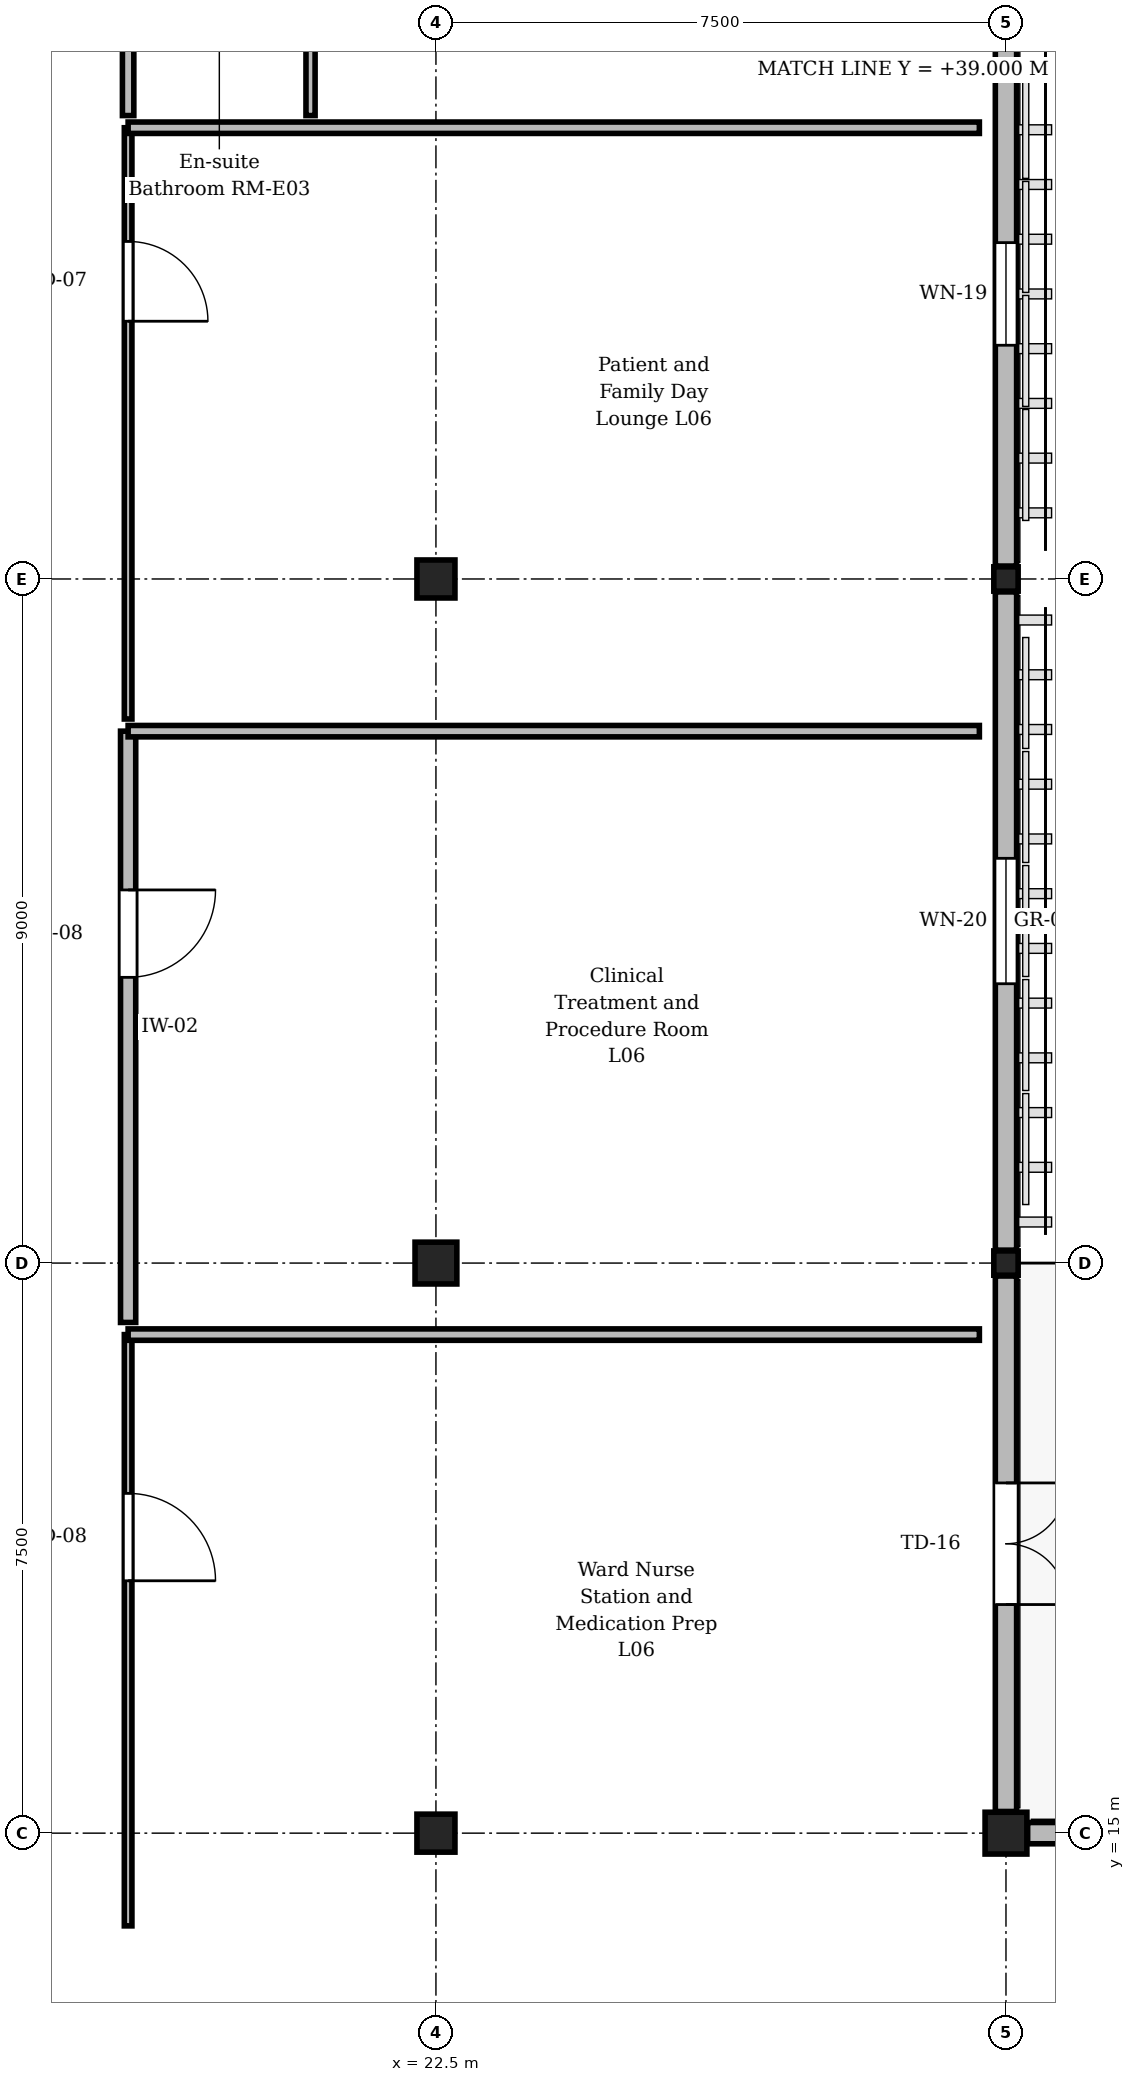
"""IFC4 building model, lengths in metres.
Left out: names, types, materials, properties, quantities, classifications, styles, units other than length and angle.
Written with IfcOpenShell. Run it as: python <this file> out.ifc"""

import sys

from ifc_helpers import new_model, si_unit, direction, frame, frame_2d, origin, origin_2d, place, context, subcontext, project, spatial, rectangle, extrude, element, fill, save


model = new_model("IFC4")
c1 = context("Model", 3, precision=1e-05, world=origin(), true_north=direction((0.0, 1.0)))
c2 = subcontext(c1, "Body", "Model", "MODEL_VIEW")
j1 = project(units=[si_unit("LENGTHUNIT", "METRE"), si_unit("PLANEANGLEUNIT", "RADIAN")], contexts=[c1])
p1 = place(None, origin())
s1 = spatial("IfcSite", under=j1, at=p1, CompositionType="ELEMENT")
p2 = place(p1, origin())
s2 = spatial("IfcBuilding", under=s1, at=p2, CompositionType="ELEMENT")
p3 = place(p2, frame((0.0, 0.0, 25.95)))
s3 = spatial("IfcBuildingStorey", under=s2, at=p3, CompositionType="ELEMENT", Elevation=25.95)
p4 = place(p3, frame((22.5, 15.0, 0.0), z_axis=(0.0, 0.0, 1.0), x_axis=(1.0, 0.0, 0.0)))
e1 = element("IfcColumn", 1, at=p4, inside=s3, PredefinedType="COLUMN", context=c2, shape_type="SweptSolid", body=[
    extrude(rectangle(XDim=0.5, YDim=0.5, at=origin_2d()), origin(), (0.0, 0.0, 1.0), 4.05),
])
p5 = place(p3, frame((22.5, 22.5, 0.0), z_axis=(0.0, 0.0, 1.0), x_axis=(1.0, 0.0, 0.0)))
e2 = element("IfcColumn", 2, at=p5, inside=s3, PredefinedType="COLUMN", context=c2, shape_type="SweptSolid", body=[
    extrude(rectangle(XDim=0.55, YDim=0.55, at=origin_2d()), origin(), (0.0, 0.0, 1.0), 4.05),
])
p6 = place(p3, frame((22.5, 31.5, 0.0), z_axis=(0.0, 0.0, 1.0), x_axis=(1.0, 0.0, 0.0)))
e3 = element("IfcColumn", 3, at=p6, inside=s3, PredefinedType="COLUMN", context=c2, shape_type="SweptSolid", body=[
    extrude(rectangle(XDim=0.5, YDim=0.5, at=origin_2d()), origin(), (0.0, 0.0, 1.0), 4.05),
])
p7 = place(p3, frame((30.0, 15.0, 0.0), z_axis=(0.0, 0.0, 1.0), x_axis=(1.0, 0.0, 0.0)))
e4 = element("IfcColumn", 4, at=p7, inside=s3, PredefinedType="COLUMN", context=c2, shape_type="SweptSolid", body=[
    extrude(rectangle(XDim=0.55, YDim=0.55, at=origin_2d()), origin(), (0.0, 0.0, 1.0), 4.05),
])
for number, where, z_axis, x_axis in (
    (5, (30.0, 22.5, 0.0), (0.0, 0.0, 1.0), (1.0, 0.0, 0.0)),
    (6, (30.0, 31.5, 0.0), (0.0, 0.0, 1.0), (1.0, 0.0, 0.0)),
):
    element("IfcColumn", number, at=place(p3, frame(where, z_axis=z_axis, x_axis=x_axis)), inside=s3, PredefinedType="COLUMN", context=c2, shape_type="SweptSolid", body=[
        extrude(rectangle(XDim=0.32, YDim=0.32, at=origin_2d()), origin(), (0.0, 0.0, 1.0), 4.05),
    ])
p8 = place(p3, frame((30.0, 22.33, 0.0), z_axis=(0.0, 0.0, 1.0), x_axis=(0.0, -1.0, 0.0)))
e7 = element("IfcWall", 7, at=p8, inside=s3, PredefinedType="STANDARD", context=c2, shape_type="SweptSolid", body=[
    extrude(rectangle(XDim=7.045, YDim=0.28, at=frame_2d((3.522, 0.0))), origin(), (0.0, 0.0, 1.0), 3.17),
])
p9 = place(p8, frame((2.722, 0.0, 0.0)))
e8 = element("IfcOpeningElement", 8, at=p9, cuts=e7, PredefinedType="OPENING", context=c2, shape_type="SweptSolid", body=[
    extrude(rectangle(XDim=1.6, YDim=2.35, at=frame_2d((0.8, 1.175))), frame((0.0, 0.15, 0.0), z_axis=(0.0, -1.0, 0.0), x_axis=(1.0, 0.0, 0.0)), (0.0, 0.0, 1.0), 0.3),
])
p10 = place(p3, frame((30.0, 31.33, 0.0), z_axis=(0.0, 0.0, 1.0), x_axis=(0.0, -1.0, 0.0)))
e9 = element("IfcWall", 9, at=p10, inside=s3, PredefinedType="STANDARD", context=c2, shape_type="SweptSolid", body=[
    extrude(rectangle(XDim=8.66, YDim=0.28, at=frame_2d((4.33, 0.0))), origin(), (0.0, 0.0, 1.0), 3.22),
])
p11 = place(p10, frame((3.505, 0.0, 0.85)))
e10 = element("IfcOpeningElement", 10, at=p11, cuts=e9, PredefinedType="OPENING", context=c2, shape_type="SweptSolid", body=[
    extrude(rectangle(XDim=1.65, YDim=2.09, at=frame_2d((0.825, 1.045))), frame((0.0, 0.15, 0.0), z_axis=(0.0, -1.0, 0.0), x_axis=(1.0, 0.0, 0.0)), (0.0, 0.0, 1.0), 0.3),
])
p12 = place(p3, frame((30.0, 38.83, 0.0), z_axis=(0.0, 0.0, 1.0), x_axis=(0.0, -1.0, 0.0)))
e11 = element("IfcWall", 11, at=p12, inside=s3, PredefinedType="STANDARD", context=c2, shape_type="SweptSolid", body=[
    extrude(rectangle(XDim=7.16, YDim=0.28, at=frame_2d((3.58, 0.0))), origin(), (0.0, 0.0, 1.0), 3.17),
])
p13 = place(p12, frame((2.905, 0.0, 0.85)))
e12 = element("IfcOpeningElement", 12, at=p13, cuts=e11, PredefinedType="OPENING", context=c2, shape_type="SweptSolid", body=[
    extrude(rectangle(XDim=1.35, YDim=2.04, at=frame_2d((0.675, 1.02))), frame((0.0, 0.15, 0.0), z_axis=(0.0, -1.0, 0.0), x_axis=(1.0, 0.0, 0.0)), (0.0, 0.0, 1.0), 0.3),
])
p14 = place(p3, frame((30.285, 15.0, 0.0), z_axis=(0.0, 0.0, 1.0), x_axis=(1.0, 0.0, 0.0)))
e13 = element("IfcWall", 13, at=p14, inside=s3, PredefinedType="STANDARD", context=c2, shape_type="SweptSolid", body=[
    extrude(rectangle(XDim=6.98, YDim=0.28, at=frame_2d((3.49, 0.0))), origin(), (0.0, 0.0, 1.0), 3.17),
])
p15 = place(p14, frame((2.69, 0.0, 0.0)))
e14 = element("IfcOpeningElement", 14, at=p15, cuts=e13, PredefinedType="OPENING", context=c2, shape_type="SweptSolid", body=[
    extrude(rectangle(XDim=1.6, YDim=2.35, at=frame_2d((0.8, 1.175))), frame((0.0, 0.15, 0.0), z_axis=(0.0, -1.0, 0.0), x_axis=(1.0, 0.0, 0.0)), (0.0, 0.0, 1.0), 0.3),
])
p16 = place(p3, frame((18.45, 21.559, 0.0), z_axis=(0.0, 0.0, 1.0), x_axis=(0.0, -1.0, 0.0)))
e15 = element("IfcWall", 15, at=p16, inside=s3, PredefinedType="PARTITIONING", context=c2, shape_type="SweptSolid", body=[
    extrude(rectangle(XDim=7.779, YDim=0.1, at=frame_2d((3.889, 0.0))), origin(), (0.0, 0.0, 1.0), 3.755),
])
p17 = place(p16, frame((2.089, 0.0, 0.0)))
e16 = element("IfcOpeningElement", 16, at=p17, cuts=e15, PredefinedType="OPENING", context=c2, shape_type="SweptSolid", body=[
    extrude(rectangle(XDim=1.15, YDim=2.2, at=frame_2d((0.575, 1.1))), frame((0.0, 0.06, 0.0), z_axis=(0.0, -1.0, 0.0), x_axis=(1.0, 0.0, 0.0)), (0.0, 0.0, 1.0), 0.12),
])
p18 = place(p3, frame((18.45, 29.498, 0.0), z_axis=(0.0, 0.0, 1.0), x_axis=(0.0, -1.0, 0.0)))
e17 = element("IfcWall", 17, at=p18, inside=s3, PredefinedType="STANDARD", context=c2, shape_type="SweptSolid", body=[
    extrude(rectangle(XDim=7.779, YDim=0.2, at=frame_2d((3.889, 0.0))), origin(), (0.0, 0.0, 1.0), 3.355),
])
p19 = place(p18, frame((2.089, 0.0, 0.0)))
e18 = element("IfcOpeningElement", 18, at=p19, cuts=e17, PredefinedType="OPENING", context=c2, shape_type="SweptSolid", body=[
    extrude(rectangle(XDim=1.15, YDim=2.2, at=frame_2d((0.575, 1.1))), frame((0.0, 0.11, 0.0), z_axis=(0.0, -1.0, 0.0), x_axis=(1.0, 0.0, 0.0)), (0.0, 0.0, 1.0), 0.22),
])
p20 = place(p3, frame((18.45, 37.437, 0.0), z_axis=(0.0, 0.0, 1.0), x_axis=(0.0, -1.0, 0.0)))
e19 = element("IfcWall", 19, at=p20, inside=s3, PredefinedType="PARTITIONING", context=c2, shape_type="SweptSolid", body=[
    extrude(rectangle(XDim=7.779, YDim=0.1, at=frame_2d((3.89, 0.0))), origin(), (0.0, 0.0, 1.0), 3.355),
])
p21 = place(p20, frame((1.496, 0.0, 0.0)))
e20 = element("IfcOpeningElement", 20, at=p21, cuts=e19, PredefinedType="OPENING", context=c2, shape_type="SweptSolid", body=[
    extrude(rectangle(XDim=1.05, YDim=2.2, at=frame_2d((0.525, 1.1))), frame((0.0, 0.06, 0.0), z_axis=(0.0, -1.0, 0.0), x_axis=(1.0, 0.0, 0.0)), (0.0, 0.0, 1.0), 0.12),
])
p22 = place(p3, frame((18.45, 45.375, 0.0), z_axis=(0.0, 0.0, 1.0), x_axis=(0.0, -1.0, 0.0)))
e21 = element("IfcWall", 21, at=p22, inside=s3, PredefinedType="PARTITIONING", context=c2, shape_type="SweptSolid", body=[
    extrude(rectangle(XDim=7.779, YDim=0.15, at=frame_2d((3.889, 0.0))), origin(), (0.0, 0.0, 1.0), 3.755),
])
p23 = place(p22, frame((2.029, 0.0, 0.0)))
e22 = element("IfcOpeningElement", 22, at=p23, cuts=e21, PredefinedType="OPENING", context=c2, shape_type="SweptSolid", body=[
    extrude(rectangle(XDim=1.35, YDim=2.25, at=frame_2d((0.675, 1.125))), frame((0.0, 0.085, 0.0), z_axis=(0.0, -1.0, 0.0), x_axis=(1.0, 0.0, 0.0)), (0.0, 0.0, 1.0), 0.17),
])
p24 = place(p3, frame((20.85, 37.597, 0.0), z_axis=(0.0, 0.0, 1.0), x_axis=(0.0, 1.0, 0.0)))
e23 = element("IfcWall", 23, at=p24, inside=s3, PredefinedType="PARTITIONING", context=c2, shape_type="SweptSolid", body=[
    extrude(rectangle(XDim=2.0, YDim=0.12, at=frame_2d((1.0, 0.0))), origin(), (0.0, 0.0, 1.0), 3.755),
])
for number, where, z_axis, x_axis in (
    (24, (18.45, 21.559, 0.0), (0.0, 0.0, 1.0), (1.0, 0.0, 0.0)),
    (25, (18.45, 29.498, 0.0), (0.0, 0.0, 1.0), (1.0, 0.0, 0.0)),
    (26, (18.45, 37.437, 0.0), (0.0, 0.0, 1.0), (1.0, 0.0, 0.0)),
):
    element("IfcWall", number, at=place(p3, frame(where, z_axis=z_axis, x_axis=x_axis)), inside=s3, PredefinedType="PARTITIONING", context=c2, shape_type="SweptSolid", body=[
        extrude(rectangle(XDim=11.2, YDim=0.15, at=frame_2d((5.6, 0.0))), origin(), (0.0, 0.0, 1.0), 3.755),
    ])
p25 = place(p9, origin())
e27 = element("IfcDoor", 27, at=p25, inside=s3, OperationType="DOUBLE_DOOR_SINGLE_SWING", PredefinedType="DOOR", context=c2, shape_type="SweptSolid", body=[
    extrude(rectangle(XDim=1.6, YDim=2.35, at=frame_2d((0.8, 1.175))), frame((0.0, 0.025, 0.0), z_axis=(0.0, -1.0, 0.0), x_axis=(1.0, 0.0, 0.0)), (0.0, 0.0, 1.0), 0.05),
])
fill(e8, e27)
p26 = place(p11, origin())
e28 = element("IfcWindow", 28, at=p26, inside=s3, PartitioningType="SINGLE_PANEL", PredefinedType="WINDOW", context=c2, shape_type="SweptSolid", body=[
    extrude(rectangle(XDim=1.65, YDim=2.09, at=frame_2d((0.825, 1.045))), frame((0.0, 0.03, 0.0), z_axis=(0.0, -1.0, 0.0), x_axis=(1.0, 0.0, 0.0)), (0.0, 0.0, 1.0), 0.06),
])
fill(e10, e28)
p27 = place(p13, origin())
e29 = element("IfcWindow", 29, at=p27, inside=s3, PartitioningType="SINGLE_PANEL", PredefinedType="WINDOW", context=c2, shape_type="SweptSolid", body=[
    extrude(rectangle(XDim=1.35, YDim=2.04, at=frame_2d((0.675, 1.02))), frame((0.0, 0.03, 0.0), z_axis=(0.0, -1.0, 0.0), x_axis=(1.0, 0.0, 0.0)), (0.0, 0.0, 1.0), 0.06),
])
fill(e12, e29)
p28 = place(p17, origin())
e30 = element("IfcDoor", 30, at=p28, inside=s3, OperationType="SINGLE_SWING_RIGHT", PredefinedType="DOOR", context=c2, shape_type="SweptSolid", body=[
    extrude(rectangle(XDim=1.15, YDim=2.2, at=frame_2d((0.575, 1.1))), frame((0.0, 0.025, 0.0), z_axis=(0.0, -1.0, 0.0), x_axis=(1.0, 0.0, 0.0)), (0.0, 0.0, 1.0), 0.05),
])
fill(e16, e30)
p29 = place(p19, origin())
e31 = element("IfcDoor", 31, at=p29, inside=s3, OperationType="SINGLE_SWING_LEFT", PredefinedType="DOOR", context=c2, shape_type="SweptSolid", body=[
    extrude(rectangle(XDim=1.15, YDim=2.2, at=frame_2d((0.575, 1.1))), frame((0.0, 0.025, 0.0), z_axis=(0.0, -1.0, 0.0), x_axis=(1.0, 0.0, 0.0)), (0.0, 0.0, 1.0), 0.05),
])
fill(e18, e31)
p30 = place(p21, origin())
e32 = element("IfcDoor", 32, at=p30, inside=s3, OperationType="SINGLE_SWING_RIGHT", PredefinedType="DOOR", context=c2, shape_type="SweptSolid", body=[
    extrude(rectangle(XDim=1.05, YDim=2.2, at=frame_2d((0.525, 1.1))), frame((0.0, 0.025, 0.0), z_axis=(0.0, -1.0, 0.0), x_axis=(1.0, 0.0, 0.0)), (0.0, 0.0, 1.0), 0.05),
])
fill(e20, e32)
save(model, sys.argv[1])
